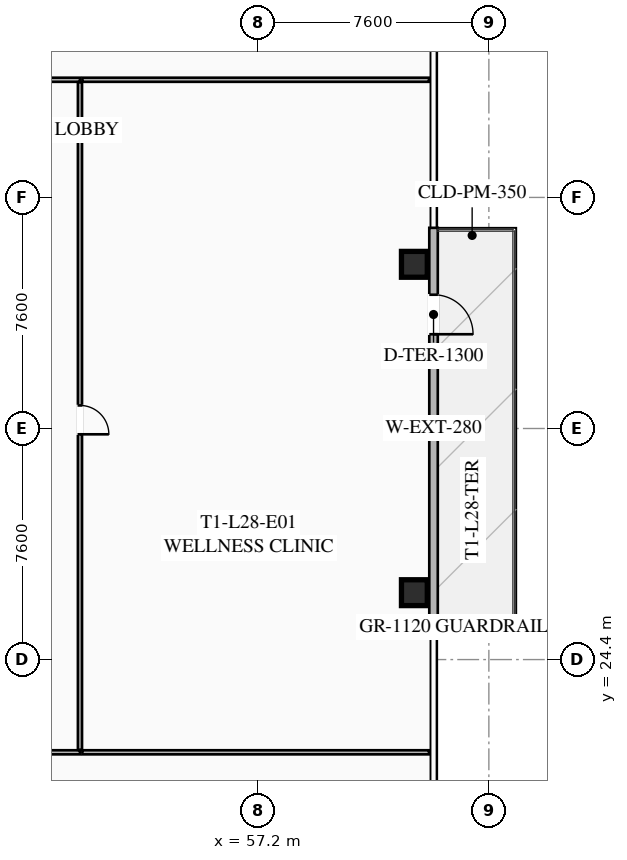
"""IFC4 building model, lengths in metres.
Left out: names, types, materials, properties, quantities, classifications, styles, units other than length and angle.
Written with IfcOpenShell. Run it as: python <this file> out.ifc"""

import sys

from ifc_helpers import new_model, si_unit, direction, frame, frame_2d, origin, origin_2d, place, context, subcontext, project, spatial, rectangle, hollow_rectangle, extrude, element, fill, save


model = new_model("IFC4")
c1 = context("Model", 3, precision=1e-05, world=origin(), true_north=direction((0.0, 1.0)))
c2 = subcontext(c1, "Body", "Model", "MODEL_VIEW")
j1 = project(units=[si_unit("LENGTHUNIT", "METRE"), si_unit("PLANEANGLEUNIT", "RADIAN")], contexts=[c1])
p1 = place(None, origin())
s1 = spatial("IfcSite", under=j1, at=p1, CompositionType="ELEMENT")
p2 = place(p1, origin())
s2 = spatial("IfcBuilding", under=s1, at=p2, CompositionType="ELEMENT")
p3 = place(p2, frame((0.0, 0.0, 106.25)))
s3 = spatial("IfcBuildingStorey", under=s2, at=p3, CompositionType="ELEMENT", Elevation=106.25)
for number, where, z_axis, x_axis in (
    (1, (62.35, 26.6, 0.0), (0.0, 0.0, 1.0), (1.0, 0.0, 0.0)),
    (2, (62.35, 37.4, 0.0), (0.0, 0.0, 1.0), (1.0, 0.0, 0.0)),
):
    element("IfcColumn", number, at=place(p3, frame(where, z_axis=z_axis, x_axis=x_axis)), inside=s3, PredefinedType="COLUMN", context=c2, shape_type="SweptSolid", body=[
        extrude(hollow_rectangle(XDim=0.85, YDim=0.85, WallThickness=0.035, at=origin_2d()), origin(), (0.0, 0.0, 1.0), 3.25),
    ])
p4 = place(p3, frame((62.98, 38.6, 0.0), z_axis=(0.0, 0.0, 1.0), x_axis=(0.0, -1.0, 0.0)))
e3 = element("IfcWall", 3, at=p4, inside=s3, PredefinedType="SOLIDWALL", context=c2, shape_type="SweptSolid", body=[
    extrude(rectangle(XDim=13.2, YDim=0.28, at=frame_2d((6.6, 0.0))), origin(), (0.0, 0.0, 1.0), 3.25),
])
p5 = place(p4, frame((2.2, 0.0, 0.0)))
e4 = element("IfcOpeningElement", 4, at=p5, cuts=e3, PredefinedType="OPENING", context=c2, shape_type="SweptSolid", body=[
    extrude(rectangle(XDim=1.3, YDim=2.15, at=frame_2d((0.65, 1.075))), frame((0.0, 0.15, 0.0), z_axis=(0.0, -1.0, 0.0), x_axis=(1.0, 0.0, 0.0)), (0.0, 0.0, 1.0), 0.3),
])
p6 = place(p3, frame((24.05, 43.47, 0.0), z_axis=(0.0, 0.0, 1.0), x_axis=(1.0, 0.0, 0.0)))
e5 = element("IfcWall", 5, at=p6, inside=s3, PredefinedType="PARTITIONING", context=c2, shape_type="SweptSolid", body=[
    extrude(rectangle(XDim=27.3, YDim=0.135, at=frame_2d((13.65, 0.0))), origin(), (0.0, 0.0, 1.0), 2.393),
])
p7 = place(p6, frame((0.3, 0.0, 0.0)))
e6 = element("IfcOpeningElement", 6, at=p7, cuts=e5, PredefinedType="OPENING", context=c2, shape_type="SweptSolid", body=[
    extrude(rectangle(XDim=0.95, YDim=2.05, at=frame_2d((0.475, 1.025))), frame((0.0, 0.077, 0.0), z_axis=(0.0, -1.0, 0.0), x_axis=(1.0, 0.0, 0.0)), (0.0, 0.0, 1.0), 0.155),
])
p8 = place(p3, frame((51.35, 21.35, 0.0), z_axis=(0.0, 0.0, 1.0), x_axis=(-1.0, 0.0, 0.0)))
e7 = element("IfcWall", 7, at=p8, inside=s3, PredefinedType="PARTITIONING", context=c2, shape_type="SweptSolid", body=[
    extrude(rectangle(XDim=27.3, YDim=0.135, at=frame_2d((13.65, 0.0))), origin(), (0.0, 0.0, 1.0), 2.393),
])
p9 = place(p8, frame((25.97, 0.0, 0.0)))
e8 = element("IfcOpeningElement", 8, at=p9, cuts=e7, PredefinedType="OPENING", context=c2, shape_type="SweptSolid", body=[
    extrude(rectangle(XDim=0.95, YDim=2.05, at=frame_2d((0.475, 1.025))), frame((0.0, 0.077, 0.0), z_axis=(0.0, -1.0, 0.0), x_axis=(1.0, 0.0, 0.0)), (0.0, 0.0, 1.0), 0.155),
])
p10 = place(p8, frame((8.663, 0.0, 0.0)))
e9 = element("IfcOpeningElement", 9, at=p10, cuts=e7, PredefinedType="OPENING", context=c2, shape_type="SweptSolid", body=[
    extrude(rectangle(XDim=0.95, YDim=2.05, at=frame_2d((0.475, 1.025))), frame((0.0, 0.077, 0.0), z_axis=(0.0, -1.0, 0.0), x_axis=(1.0, 0.0, 0.0)), (0.0, 0.0, 1.0), 0.155),
])
p11 = place(p3, frame((51.35, 43.39, 0.0), z_axis=(0.0, 0.0, 1.0), x_axis=(0.0, -1.0, 0.0)))
e10 = element("IfcWall", 10, at=p11, inside=s3, PredefinedType="PARTITIONING", context=c2, shape_type="SweptSolid", body=[
    extrude(rectangle(XDim=21.96, YDim=0.135, at=frame_2d((10.98, 0.0))), origin(), (0.0, 0.0, 1.0), 2.393),
])
p12 = place(p11, frame((10.631, 0.0, 0.0)))
e11 = element("IfcOpeningElement", 11, at=p12, cuts=e10, PredefinedType="OPENING", context=c2, shape_type="SweptSolid", body=[
    extrude(rectangle(XDim=0.95, YDim=2.05, at=frame_2d((0.475, 1.025))), frame((0.0, 0.077, 0.0), z_axis=(0.0, -1.0, 0.0), x_axis=(1.0, 0.0, 0.0)), (0.0, 0.0, 1.0), 0.155),
])
for number, where, z_axis, x_axis in (
    (12, (62.83, 43.47, 0.0), (0.0, 0.0, 1.0), (-1.0, 0.0, 0.0)),
    (13, (51.43, 21.35, 0.0), (0.0, 0.0, 1.0), (1.0, 0.0, 0.0)),
):
    element("IfcWall", number, at=place(p3, frame(where, z_axis=z_axis, x_axis=x_axis)), inside=s3, PredefinedType="PARTITIONING", context=c2, shape_type="SweptSolid", body=[
        extrude(rectangle(XDim=11.4, YDim=0.135, at=frame_2d((5.7, 0.0))), origin(), (0.0, 0.0, 1.0), 2.393),
    ])
p13 = place(p5, origin())
e14 = element("IfcDoor", 14, at=p13, inside=s3, OperationType="SINGLE_SWING_RIGHT", PredefinedType="DOOR", context=c2, shape_type="SweptSolid", body=[
    extrude(rectangle(XDim=1.3, YDim=2.15, at=frame_2d((0.65, 1.075))), frame((0.0, 0.025, 0.0), z_axis=(0.0, -1.0, 0.0), x_axis=(1.0, 0.0, 0.0)), (0.0, 0.0, 1.0), 0.05),
])
fill(e4, e14)
p14 = place(p12, origin())
e15 = element("IfcDoor", 15, at=p14, inside=s3, OperationType="SINGLE_SWING_RIGHT", PredefinedType="DOOR", context=c2, shape_type="SweptSolid", body=[
    extrude(rectangle(XDim=0.95, YDim=2.05, at=frame_2d((0.475, 1.025))), frame((0.0, 0.025, 0.0), z_axis=(0.0, -1.0, 0.0), x_axis=(1.0, 0.0, 0.0)), (0.0, 0.0, 1.0), 0.05),
])
fill(e11, e15)
save(model, sys.argv[1])
